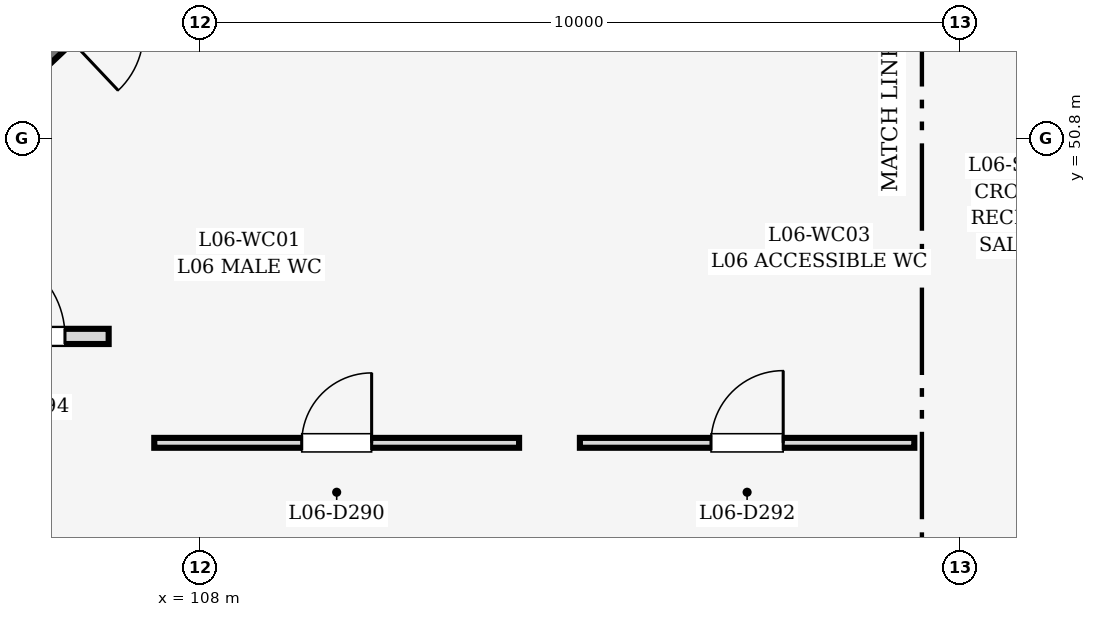
"""IFC4 building model, lengths in metres.
Left out: names, types, materials, properties, quantities, classifications, styles, units other than length and angle.
Written with IfcOpenShell. Run it as: python <this file> out.ifc"""

import sys

from ifc_helpers import new_model, si_unit, direction, frame, frame_2d, origin, place, context, subcontext, project, spatial, rectangle, extrude, element, fill, save


model = new_model("IFC4")
c1 = context("Model", 3, precision=1e-05, world=origin(), true_north=direction((0.0, 1.0)))
c2 = subcontext(c1, "Body", "Model", "MODEL_VIEW")
j1 = project(units=[si_unit("LENGTHUNIT", "METRE"), si_unit("PLANEANGLEUNIT", "RADIAN")], contexts=[c1])
p1 = place(None, origin())
s1 = spatial("IfcSite", under=j1, at=p1, CompositionType="ELEMENT")
p2 = place(p1, origin())
s2 = spatial("IfcBuilding", under=s1, at=p2, CompositionType="ELEMENT")
p3 = place(p2, frame((0.0, 0.0, 23.7)))
s3 = spatial("IfcBuildingStorey", under=s2, at=p3, CompositionType="ELEMENT", Elevation=23.7)
p4 = place(p3, frame((107.934, 53.845, 0.0), z_axis=(0.0, 0.0, 1.0), x_axis=(-0.727127996206, -0.686501913423, 0.0)))
e1 = element("IfcWall", 1, at=p4, inside=s3, PredefinedType="SOLIDWALL", context=c2, shape_type="SweptSolid", body=[
    extrude(rectangle(XDim=3.714, YDim=0.38, at=frame_2d((1.857, 0.0))), origin(), (0.0, 0.0, 1.0), 4.5),
])
p5 = place(p4, frame((1.327, 0.0, 0.0)))
e2 = element("IfcOpeningElement", 2, at=p5, cuts=e1, PredefinedType="OPENING", context=c2, shape_type="SweptSolid", body=[
    extrude(rectangle(XDim=1.06, YDim=2.24, at=frame_2d((0.53, 1.12))), frame((0.0, 0.202, 0.0), z_axis=(0.0, -1.0, 0.0), x_axis=(1.0, 0.0, 0.0)), (0.0, 0.0, 1.0), 0.404),
])
p6 = place(p3, frame((107.4, 46.8, 0.0), z_axis=(0.0, 0.0, 1.0), x_axis=(1.0, 0.0, 0.0)))
e3 = element("IfcWall", 3, at=p6, inside=s3, PredefinedType="PARTITIONING", context=c2, shape_type="SweptSolid", body=[
    extrude(rectangle(XDim=4.8, YDim=0.13, at=frame_2d((2.4, 0.0))), origin(), (0.0, 0.0, 1.0), 4.485),
])
p7 = place(p6, frame((1.94, 0.0, 0.0)))
e4 = element("IfcOpeningElement", 4, at=p7, cuts=e3, PredefinedType="OPENING", context=c2, shape_type="SweptSolid", body=[
    extrude(rectangle(XDim=0.92, YDim=2.1, at=frame_2d((0.46, 1.05))), frame((0.0, 0.077, 0.0), z_axis=(0.0, -1.0, 0.0), x_axis=(1.0, 0.0, 0.0)), (0.0, 0.0, 1.0), 0.154),
])
p8 = place(p3, frame((113.0, 46.8, 0.0), z_axis=(0.0, 0.0, 1.0), x_axis=(1.0, 0.0, 0.0)))
e5 = element("IfcWall", 5, at=p8, inside=s3, PredefinedType="PARTITIONING", context=c2, shape_type="SweptSolid", body=[
    extrude(rectangle(XDim=4.4, YDim=0.13, at=frame_2d((2.2, 0.0))), origin(), (0.0, 0.0, 1.0), 4.485),
])
p9 = place(p8, frame((1.725, 0.0, 0.0)))
e6 = element("IfcOpeningElement", 6, at=p9, cuts=e5, PredefinedType="OPENING", context=c2, shape_type="SweptSolid", body=[
    extrude(rectangle(XDim=0.95, YDim=2.15, at=frame_2d((0.475, 1.075))), frame((0.0, 0.077, 0.0), z_axis=(0.0, -1.0, 0.0), x_axis=(1.0, 0.0, 0.0)), (0.0, 0.0, 1.0), 0.154),
])
p10 = place(p3, frame((102.0, 48.2, 0.0), z_axis=(0.0, 0.0, 1.0), x_axis=(1.0, 0.0, 0.0)))
e7 = element("IfcWall", 7, at=p10, inside=s3, PredefinedType="PARTITIONING", context=c2, shape_type="SweptSolid", body=[
    extrude(rectangle(XDim=4.8, YDim=0.2, at=frame_2d((2.4, 0.0))), origin(), (0.0, 0.0, 1.0), 3.954),
])
p11 = place(p10, frame((3.075, 0.0, 0.0)))
e8 = element("IfcOpeningElement", 8, at=p11, cuts=e7, PredefinedType="OPENING", context=c2, shape_type="SweptSolid", body=[
    extrude(rectangle(XDim=1.15, YDim=2.25, at=frame_2d((0.575, 1.125))), frame((0.0, 0.112, 0.0), z_axis=(0.0, -1.0, 0.0), x_axis=(1.0, 0.0, 0.0)), (0.0, 0.0, 1.0), 0.224),
])
p12 = place(p7, origin())
e9 = element("IfcDoor", 9, at=p12, inside=s3, OperationType="SINGLE_SWING_RIGHT", PredefinedType="DOOR", context=c2, shape_type="SweptSolid", body=[
    extrude(rectangle(XDim=0.92, YDim=2.1, at=frame_2d((0.46, 1.05))), frame((0.0, 0.025, 0.0), z_axis=(0.0, -1.0, 0.0), x_axis=(1.0, 0.0, 0.0)), (0.0, 0.0, 1.0), 0.05),
])
fill(e4, e9)
p13 = place(p9, origin())
e10 = element("IfcDoor", 10, at=p13, inside=s3, OperationType="SINGLE_SWING_RIGHT", PredefinedType="DOOR", context=c2, shape_type="SweptSolid", body=[
    extrude(rectangle(XDim=0.95, YDim=2.15, at=frame_2d((0.475, 1.075))), frame((0.0, 0.025, 0.0), z_axis=(0.0, -1.0, 0.0), x_axis=(1.0, 0.0, 0.0)), (0.0, 0.0, 1.0), 0.05),
])
fill(e6, e10)
p14 = place(p11, origin())
e11 = element("IfcDoor", 11, at=p14, inside=s3, OperationType="SINGLE_SWING_LEFT", PredefinedType="DOOR", context=c2, shape_type="SweptSolid", body=[
    extrude(rectangle(XDim=1.15, YDim=2.25, at=frame_2d((0.575, 1.125))), frame((0.0, 0.025, 0.0), z_axis=(0.0, -1.0, 0.0), x_axis=(1.0, 0.0, 0.0)), (0.0, 0.0, 1.0), 0.05),
])
fill(e8, e11)
save(model, sys.argv[1])
